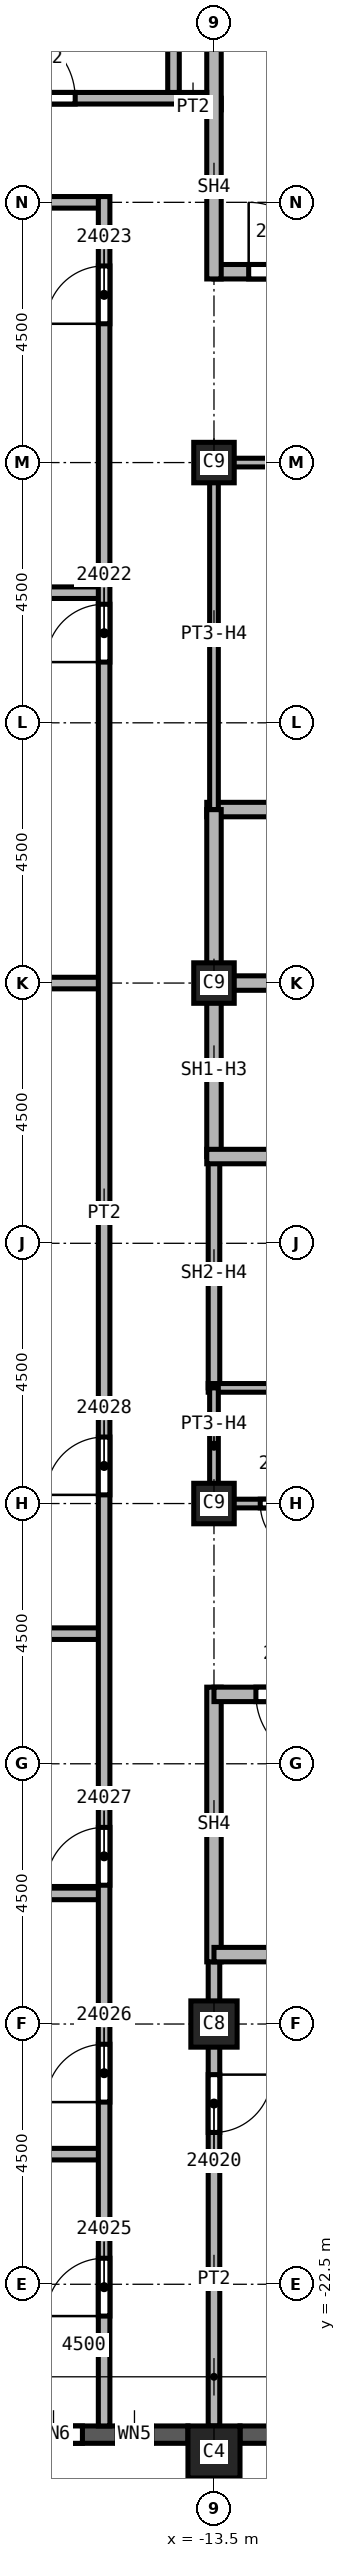
"""IFC4 building model, lengths in metres.
Left out: names, types, materials, properties, quantities, classifications, styles, units other than length and angle.
Written with IfcOpenShell. Run it as: python <this file> out.ifc"""

import sys

from ifc_helpers import new_model, si_unit, direction, frame, frame_2d, origin, origin_2d, place, context, subcontext, project, spatial, rectangle, extrude, element, fill, save


model = new_model("IFC4")
c1 = context("Model", 3, precision=1e-05, world=origin(), true_north=direction((0.0, 1.0)))
c2 = subcontext(c1, "Body", "Model", "MODEL_VIEW")
j1 = project(units=[si_unit("LENGTHUNIT", "METRE"), si_unit("PLANEANGLEUNIT", "RADIAN")], contexts=[c1])
p1 = place(None, origin())
s1 = spatial("IfcSite", under=j1, at=p1, CompositionType="ELEMENT")
p2 = place(p1, origin())
s2 = spatial("IfcBuilding", under=s1, at=p2, CompositionType="ELEMENT")
p3 = place(p2, frame((0.0, 0.0, 338.0)))
s3 = spatial("IfcBuildingStorey", under=s2, at=p3, CompositionType="ELEMENT", Elevation=338.0)
p4 = place(p3, frame((-13.5, -18.0, 0.0), z_axis=(0.0, 0.0, 1.0), x_axis=(1.0, 0.0, 0.0)))
e1 = element("IfcColumn", 1, at=p4, inside=s3, PredefinedType="COLUMN", context=c2, shape_type="SweptSolid", body=[
    extrude(rectangle(XDim=0.8, YDim=0.8, at=origin_2d()), origin(), (0.0, 0.0, 1.0), 3.74),
])
for number, where, z_axis, x_axis in (
    (2, (-13.5, 0.0, 0.0), (0.0, 0.0, 1.0), (1.0, 0.0, 0.0)),
    (3, (-13.5, 9.0, 0.0), (0.0, 0.0, 1.0), (1.0, 0.0, 0.0)),
    (4, (-13.5, -9.0, 0.0), (0.0, 0.0, 1.0), (1.0, 0.0, 0.0)),
):
    element("IfcColumn", number, at=place(p3, frame(where, z_axis=z_axis, x_axis=x_axis)), inside=s3, PredefinedType="COLUMN", context=c2, shape_type="SweptSolid", body=[
        extrude(rectangle(XDim=0.7, YDim=0.7, at=origin_2d()), origin(), (0.0, 0.0, 1.0), 3.74),
    ])
p5 = place(p3, frame((-13.5, -25.4, 0.0), z_axis=(0.0, 0.0, 1.0), x_axis=(1.0, 0.0, 0.0)))
e5 = element("IfcColumn", 5, at=p5, inside=s3, PredefinedType="COLUMN", context=c2, shape_type="SweptSolid", body=[
    extrude(rectangle(XDim=0.9, YDim=0.9, at=origin_2d()), origin(), (0.0, 0.0, 1.0), 3.74),
])
p6 = place(p3, frame((-17.55, -25.1, 0.0), z_axis=(0.0, 0.0, 1.0), x_axis=(1.0, 0.0, 0.0)))
e6 = element("IfcWall", 6, at=p6, inside=s3, PredefinedType="SOLIDWALL", context=c2, shape_type="SweptSolid", body=[
    extrude(rectangle(XDim=3.6, YDim=0.3, at=frame_2d((1.8, 0.0))), origin(), (0.0, 0.0, 1.0), 3.14),
])
p7 = place(p6, frame((0.775, 0.0, 0.8)))
e7 = element("IfcOpeningElement", 7, at=p7, cuts=e6, PredefinedType="OPENING", context=c2, shape_type="SweptSolid", body=[
    extrude(rectangle(XDim=1.0, YDim=1.95, at=frame_2d((0.5, 0.975))), frame((0.0, 0.15, 0.0), z_axis=(0.0, -1.0, 0.0), x_axis=(1.0, 0.0, 0.0)), (0.0, 0.0, 1.0), 0.3),
])
p8 = place(p6, frame((2.375, 0.0, 0.8)))
e8 = element("IfcOpeningElement", 8, at=p8, cuts=e6, PredefinedType="OPENING", context=c2, shape_type="SweptSolid", body=[
    extrude(rectangle(XDim=0.6, YDim=1.95, at=frame_2d((0.3, 0.975))), frame((0.0, 0.15, 0.0), z_axis=(0.0, -1.0, 0.0), x_axis=(1.0, 0.0, 0.0)), (0.0, 0.0, 1.0), 0.3),
])
p9 = place(p3, frame((-13.05, -25.1, 0.0), z_axis=(0.0, 0.0, 1.0), x_axis=(1.0, 0.0, 0.0)))
e9 = element("IfcWall", 9, at=p9, inside=s3, PredefinedType="SOLIDWALL", context=c2, shape_type="SweptSolid", body=[
    extrude(rectangle(XDim=3.6, YDim=0.3, at=frame_2d((1.8, 0.0))), origin(), (0.0, 0.0, 1.0), 3.14),
])
p10 = place(p9, frame((0.6, 0.0, 0.8)))
e10 = element("IfcOpeningElement", 10, at=p10, cuts=e9, PredefinedType="OPENING", context=c2, shape_type="SweptSolid", body=[
    extrude(rectangle(XDim=2.4, YDim=1.95, at=frame_2d((1.2, 0.975))), frame((0.0, 0.15, 0.0), z_axis=(0.0, -1.0, 0.0), x_axis=(1.0, 0.0, 0.0)), (0.0, 0.0, 1.0), 0.3),
])
for number, where, z_axis, x_axis in (
    (11, (-26.55, -15.75, 0.0), (0.0, 0.0, 1.0), (1.0, 0.0, 0.0)),
    (12, (-26.55, -11.25, 0.0), (0.0, 0.0, 1.0), (1.0, 0.0, 0.0)),
):
    element("IfcWall", number, at=place(p3, frame(where, z_axis=z_axis, x_axis=x_axis)), inside=s3, PredefinedType="PARTITIONING", context=c2, shape_type="SweptSolid", body=[
        extrude(rectangle(XDim=11.15, YDim=0.2, at=frame_2d((5.575, 0.0))), origin(), (0.0, 0.0, 1.0), 3.74),
    ])
p11 = place(p3, frame((-24.3, -20.25, 0.0), z_axis=(0.0, 0.0, 1.0), x_axis=(1.0, 0.0, 0.0)))
e13 = element("IfcWall", 13, at=p11, inside=s3, PredefinedType="PARTITIONING", context=c2, shape_type="SweptSolid", body=[
    extrude(rectangle(XDim=8.9, YDim=0.2, at=frame_2d((4.45, 0.0))), origin(), (0.0, 0.0, 1.0), 3.74),
])
p12 = place(p3, frame((-15.4, 0.0, 0.0), z_axis=(0.0, 0.0, 1.0), x_axis=(-1.0, 0.0, 0.0)))
e14 = element("IfcWall", 14, at=p12, inside=s3, PredefinedType="PARTITIONING", context=c2, shape_type="SweptSolid", body=[
    extrude(rectangle(XDim=11.15, YDim=0.2, at=frame_2d((5.575, 0.0))), origin(), (0.0, 0.0, 1.0), 3.74),
])
p13 = place(p3, frame((-20.0, 6.75, 0.0), z_axis=(0.0, 0.0, 1.0), x_axis=(1.0, 0.0, 0.0)))
e15 = element("IfcWall", 15, at=p13, inside=s3, PredefinedType="PARTITIONING", context=c2, shape_type="SweptSolid", body=[
    extrude(rectangle(XDim=4.6, YDim=0.2, at=frame_2d((2.3, 0.0))), origin(), (0.0, 0.0, 1.0), 3.74),
])
p14 = place(p3, frame((-15.4, 13.5, 0.0), z_axis=(0.0, 0.0, 1.0), x_axis=(-1.0, 0.0, 0.0)))
e16 = element("IfcWall", 16, at=p14, inside=s3, PredefinedType="PARTITIONING", context=c2, shape_type="SweptSolid", body=[
    extrude(rectangle(XDim=6.6, YDim=0.2, at=frame_2d((3.3, 0.0))), origin(), (0.0, 0.0, 1.0), 3.74),
])
p15 = place(p3, frame((-15.4, -24.95, 0.0), z_axis=(0.0, 0.0, 1.0), x_axis=(0.0, 1.0, 0.0)))
e17 = element("IfcWall", 17, at=p15, inside=s3, PredefinedType="PARTITIONING", context=c2, shape_type="SweptSolid", body=[
    extrude(rectangle(XDim=38.55, YDim=0.2, at=frame_2d((19.275, 0.0))), origin(), (0.0, 0.0, 1.0), 3.74),
])
p16 = place(p15, frame((30.5, 0.0, 0.0)))
e18 = element("IfcOpeningElement", 18, at=p16, cuts=e17, PredefinedType="OPENING", context=c2, shape_type="SweptSolid", body=[
    extrude(rectangle(XDim=1.0, YDim=2.1, at=frame_2d((0.5, 1.05))), frame((0.0, 0.1, 0.0), z_axis=(0.0, -1.0, 0.0), x_axis=(1.0, 0.0, 0.0)), (0.0, 0.0, 1.0), 0.2),
])
p17 = place(p15, frame((36.35, 0.0, 0.0)))
e19 = element("IfcOpeningElement", 19, at=p17, cuts=e17, PredefinedType="OPENING", context=c2, shape_type="SweptSolid", body=[
    extrude(rectangle(XDim=1.0, YDim=2.1, at=frame_2d((0.5, 1.05))), frame((0.0, 0.1, 0.0), z_axis=(0.0, -1.0, 0.0), x_axis=(1.0, 0.0, 0.0)), (0.0, 0.0, 1.0), 0.2),
])
p18 = place(p15, frame((1.9, 0.0, 0.0)))
e20 = element("IfcOpeningElement", 20, at=p18, cuts=e17, PredefinedType="OPENING", context=c2, shape_type="SweptSolid", body=[
    extrude(rectangle(XDim=1.0, YDim=2.1, at=frame_2d((0.5, 1.05))), frame((0.0, 0.1, 0.0), z_axis=(0.0, -1.0, 0.0), x_axis=(1.0, 0.0, 0.0)), (0.0, 0.0, 1.0), 0.2),
])
p19 = place(p15, frame((5.6, 0.0, 0.0)))
e21 = element("IfcOpeningElement", 21, at=p19, cuts=e17, PredefinedType="OPENING", context=c2, shape_type="SweptSolid", body=[
    extrude(rectangle(XDim=1.0, YDim=2.1, at=frame_2d((0.5, 1.05))), frame((0.0, 0.1, 0.0), z_axis=(0.0, -1.0, 0.0), x_axis=(1.0, 0.0, 0.0)), (0.0, 0.0, 1.0), 0.2),
])
p20 = place(p15, frame((9.35, 0.0, 0.0)))
e22 = element("IfcOpeningElement", 22, at=p20, cuts=e17, PredefinedType="OPENING", context=c2, shape_type="SweptSolid", body=[
    extrude(rectangle(XDim=1.0, YDim=2.1, at=frame_2d((0.5, 1.05))), frame((0.0, 0.1, 0.0), z_axis=(0.0, -1.0, 0.0), x_axis=(1.0, 0.0, 0.0)), (0.0, 0.0, 1.0), 0.2),
])
p21 = place(p15, frame((16.1, 0.0, 0.0)))
e23 = element("IfcOpeningElement", 23, at=p21, cuts=e17, PredefinedType="OPENING", context=c2, shape_type="SweptSolid", body=[
    extrude(rectangle(XDim=1.0, YDim=2.1, at=frame_2d((0.5, 1.05))), frame((0.0, 0.1, 0.0), z_axis=(0.0, -1.0, 0.0), x_axis=(1.0, 0.0, 0.0)), (0.0, 0.0, 1.0), 0.2),
])
p22 = place(p3, frame((-14.1, 15.2, 0.0), z_axis=(0.0, 0.0, 1.0), x_axis=(1.0, 0.0, 0.0)))
e24 = element("IfcWall", 24, at=p22, inside=s3, PredefinedType="PARTITIONING", context=c2, shape_type="SweptSolid", body=[
    extrude(rectangle(XDim=0.725, YDim=0.2, at=frame_2d((0.363, 0.0))), origin(), (0.0, 0.0, 1.0), 3.74),
])
p23 = place(p3, frame((-13.5, -16.675, 0.0), z_axis=(0.0, 0.0, 1.0), x_axis=(0.0, -1.0, 0.0)))
e25 = element("IfcWall", 25, at=p23, inside=s3, PredefinedType="PARTITIONING", context=c2, shape_type="SweptSolid", body=[
    extrude(rectangle(XDim=8.275, YDim=0.2, at=frame_2d((4.137, 0.0))), origin(), (0.0, 0.0, 1.0), 3.74),
])
p24 = place(p23, frame((2.2, 0.0, 0.0)))
e26 = element("IfcOpeningElement", 26, at=p24, cuts=e25, PredefinedType="OPENING", context=c2, shape_type="SweptSolid", body=[
    extrude(rectangle(XDim=1.0, YDim=2.1, at=frame_2d((0.5, 1.05))), frame((0.0, 0.1, 0.0), z_axis=(0.0, -1.0, 0.0), x_axis=(1.0, 0.0, 0.0)), (0.0, 0.0, 1.0), 0.2),
])
p25 = place(p3, frame((-13.5, -7.0, 0.0), z_axis=(0.0, 0.0, 1.0), x_axis=(0.0, 1.0, 0.0)))
e27 = element("IfcWall", 27, at=p25, inside=s3, PredefinedType="SOLIDWALL", context=c2, shape_type="SweptSolid", body=[
    extrude(rectangle(XDim=4.0, YDim=0.2, at=frame_2d((2.0, 0.0))), origin(), (0.0, 0.0, 1.0), 3.062),
])
p26 = place(p3, frame((-13.625, 0.0, 0.0), z_axis=(0.0, 0.0, 1.0), x_axis=(1.0, 0.0, 0.0)))
e28 = element("IfcWall", 28, at=p26, inside=s3, PredefinedType="SOLIDWALL", context=c2, shape_type="SweptSolid", body=[
    extrude(rectangle(XDim=3.125, YDim=0.25, at=frame_2d((1.562, 0.0))), origin(), (0.0, 0.0, 1.0), 3.74),
])
p27 = place(p3, frame((-13.625, 3.0, 0.0), z_axis=(0.0, 0.0, 1.0), x_axis=(1.0, 0.0, 0.0)))
e29 = element("IfcWall", 29, at=p27, inside=s3, PredefinedType="SOLIDWALL", context=c2, shape_type="SweptSolid", body=[
    extrude(rectangle(XDim=6.125, YDim=0.25, at=frame_2d((3.062, 0.0))), origin(), (0.0, 0.0, 1.0), 3.74),
])
p28 = place(p27, frame((4.0, 0.0, 0.0)))
e30 = element("IfcOpeningElement", 30, at=p28, cuts=e29, PredefinedType="OPENING", context=c2, shape_type="SweptSolid", body=[
    extrude(rectangle(XDim=1.1, YDim=2.1, at=frame_2d((0.55, 1.05))), frame((0.0, 0.125, 0.0), z_axis=(0.0, -1.0, 0.0), x_axis=(1.0, 0.0, 0.0)), (0.0, 0.0, 1.0), 0.25),
])
p29 = place(p3, frame((-13.5, -3.0, 0.0), z_axis=(0.0, 0.0, 1.0), x_axis=(0.0, 1.0, 0.0)))
e31 = element("IfcWall", 31, at=p29, inside=s3, PredefinedType="SOLIDWALL", context=c2, shape_type="SweptSolid", body=[
    extrude(rectangle(XDim=6.0, YDim=0.25, at=frame_2d((3.0, 0.0))), origin(), (0.0, 0.0, 1.0), 3.062),
])
p30 = place(p3, frame((-13.625, -3.0, 0.0), z_axis=(0.0, 0.0, 1.0), x_axis=(1.0, 0.0, 0.0)))
e32 = element("IfcWall", 32, at=p30, inside=s3, PredefinedType="SOLIDWALL", context=c2, shape_type="SweptSolid", body=[
    extrude(rectangle(XDim=6.125, YDim=0.25, at=frame_2d((3.062, 0.0))), origin(), (0.0, 0.0, 1.0), 3.74),
])
p31 = place(p30, frame((4.0, 0.0, 0.0)))
e33 = element("IfcOpeningElement", 33, at=p31, cuts=e32, PredefinedType="OPENING", context=c2, shape_type="SweptSolid", body=[
    extrude(rectangle(XDim=1.1, YDim=2.1, at=frame_2d((0.55, 1.05))), frame((0.0, 0.125, 0.0), z_axis=(0.0, -1.0, 0.0), x_axis=(1.0, 0.0, 0.0)), (0.0, 0.0, 1.0), 0.25),
])
p32 = place(p3, frame((-13.5, -12.175, 0.0), z_axis=(0.0, 0.0, 1.0), x_axis=(0.0, -1.0, 0.0)))
e34 = element("IfcWall", 34, at=p32, inside=s3, PredefinedType="SOLIDWALL", context=c2, shape_type="SweptSolid", body=[
    extrude(rectangle(XDim=4.75, YDim=0.25, at=frame_2d((2.375, 0.0))), origin(), (0.0, 0.0, 1.0), 3.74),
])
p33 = place(p3, frame((-13.5, 12.3, 0.0), z_axis=(0.0, 0.0, 1.0), x_axis=(1.0, 0.0, 0.0)))
e35 = element("IfcWall", 35, at=p33, inside=s3, PredefinedType="SOLIDWALL", context=c2, shape_type="SweptSolid", body=[
    extrude(rectangle(XDim=9.125, YDim=0.25, at=frame_2d((4.562, 0.0))), origin(), (0.0, 0.0, 1.0), 3.74),
])
p34 = place(p33, frame((0.6, 0.0, 0.0)))
e36 = element("IfcOpeningElement", 36, at=p34, cuts=e35, PredefinedType="OPENING", context=c2, shape_type="SweptSolid", body=[
    extrude(rectangle(XDim=1.2, YDim=2.1, at=frame_2d((0.6, 1.05))), frame((0.0, 0.125, 0.0), z_axis=(0.0, -1.0, 0.0), x_axis=(1.0, 0.0, 0.0)), (0.0, 0.0, 1.0), 0.25),
])
p35 = place(p3, frame((-13.5, 12.175, 0.0), z_axis=(0.0, 0.0, 1.0), x_axis=(0.0, 1.0, 0.0)))
e37 = element("IfcWall", 37, at=p35, inside=s3, PredefinedType="SOLIDWALL", context=c2, shape_type="SweptSolid", body=[
    extrude(rectangle(XDim=4.75, YDim=0.25, at=frame_2d((2.375, 0.0))), origin(), (0.0, 0.0, 1.0), 3.74),
])
p36 = place(p3, frame((-4.5, -16.8, 0.0), z_axis=(0.0, 0.0, 1.0), x_axis=(-1.0, 0.0, 0.0)))
e38 = element("IfcWall", 38, at=p36, inside=s3, PredefinedType="SOLIDWALL", context=c2, shape_type="SweptSolid", body=[
    extrude(rectangle(XDim=9.0, YDim=0.25, at=frame_2d((4.5, 0.0))), origin(), (0.0, 0.0, 1.0), 3.74),
])
p37 = place(p3, frame((-4.375, -12.3, 0.0), z_axis=(0.0, 0.0, 1.0), x_axis=(-1.0, 0.0, 0.0)))
e39 = element("IfcWall", 39, at=p37, inside=s3, PredefinedType="SOLIDWALL", context=c2, shape_type="SweptSolid", body=[
    extrude(rectangle(XDim=9.125, YDim=0.25, at=frame_2d((4.562, 0.0))), origin(), (0.0, 0.0, 1.0), 3.74),
])
p38 = place(p37, frame((7.2, 0.0, 0.0)))
e40 = element("IfcOpeningElement", 40, at=p38, cuts=e39, PredefinedType="OPENING", context=c2, shape_type="SweptSolid", body=[
    extrude(rectangle(XDim=1.2, YDim=2.1, at=frame_2d((0.6, 1.05))), frame((0.0, 0.125, 0.0), z_axis=(0.0, -1.0, 0.0), x_axis=(1.0, 0.0, 0.0)), (0.0, 0.0, 1.0), 0.25),
])
p39 = place(p3, frame((-13.6, -7.0, 0.0), z_axis=(0.0, 0.0, 1.0), x_axis=(1.0, 0.0, 0.0)))
e41 = element("IfcWall", 41, at=p39, inside=s3, PredefinedType="PARTITIONING", context=c2, shape_type="SweptSolid", body=[
    extrude(rectangle(XDim=3.1, YDim=0.15, at=frame_2d((1.55, 0.0))), origin(), (0.0, 0.0, 1.0), 3.74),
])
p40 = place(p3, frame((-13.5, -9.075, 0.0), z_axis=(0.0, 0.0, 1.0), x_axis=(0.0, 1.0, 0.0)))
e42 = element("IfcWall", 42, at=p40, inside=s3, PredefinedType="PARTITIONING", context=c2, shape_type="SweptSolid", body=[
    extrude(rectangle(XDim=2.075, YDim=0.15, at=frame_2d((1.038, 0.0))), origin(), (0.0, 0.0, 1.0), 3.062),
])
p41 = place(p3, frame((-13.5, 3.0, 0.0), z_axis=(0.0, 0.0, 1.0), x_axis=(0.0, 1.0, 0.0)))
e43 = element("IfcWall", 43, at=p41, inside=s3, PredefinedType="PARTITIONING", context=c2, shape_type="SweptSolid", body=[
    extrude(rectangle(XDim=6.075, YDim=0.15, at=frame_2d((3.038, 0.0))), origin(), (0.0, 0.0, 1.0), 3.062),
])
p42 = place(p3, frame((-13.5, 9.0, 0.0), z_axis=(0.0, 0.0, 1.0), x_axis=(1.0, 0.0, 0.0)))
e44 = element("IfcWall", 44, at=p42, inside=s3, PredefinedType="PARTITIONING", context=c2, shape_type="SweptSolid", body=[
    extrude(rectangle(XDim=3.0, YDim=0.15, at=frame_2d((1.5, 0.0))), origin(), (0.0, 0.0, 1.0), 3.062),
])
p43 = place(p3, frame((-10.5, -9.0, 0.0), z_axis=(0.0, 0.0, 1.0), x_axis=(-1.0, 0.0, 0.0)))
e45 = element("IfcWall", 45, at=p43, inside=s3, PredefinedType="PARTITIONING", context=c2, shape_type="SweptSolid", body=[
    extrude(rectangle(XDim=3.0, YDim=0.15, at=frame_2d((1.5, 0.0))), origin(), (0.0, 0.0, 1.0), 3.062),
])
p44 = place(p43, frame((1.3, 0.0, 0.0)))
e46 = element("IfcOpeningElement", 46, at=p44, cuts=e45, PredefinedType="OPENING", context=c2, shape_type="SweptSolid", body=[
    extrude(rectangle(XDim=0.9, YDim=2.1, at=frame_2d((0.45, 1.05))), frame((0.0, 0.075, 0.0), z_axis=(0.0, -1.0, 0.0), x_axis=(1.0, 0.0, 0.0)), (0.0, 0.0, 1.0), 0.15),
])
p45 = place(p3, frame((-21.9, 15.3, 0.0), z_axis=(0.0, 0.0, 1.0), x_axis=(1.0, 0.0, 0.0)))
e47 = element("IfcWall", 47, at=p45, inside=s3, PredefinedType="SOLIDWALL", context=c2, shape_type="SweptSolid", body=[
    extrude(rectangle(XDim=8.275, YDim=0.2, at=frame_2d((4.137, 0.0))), origin(), (0.0, 0.0, 1.0), 3.74),
])
p46 = place(p45, frame((4.8, 0.0, 0.0)))
e48 = element("IfcOpeningElement", 48, at=p46, cuts=e47, PredefinedType="OPENING", context=c2, shape_type="SweptSolid", body=[
    extrude(rectangle(XDim=1.2, YDim=2.1, at=frame_2d((0.6, 1.05))), frame((0.0, 0.1, 0.0), z_axis=(0.0, -1.0, 0.0), x_axis=(1.0, 0.0, 0.0)), (0.0, 0.0, 1.0), 0.2),
])
p47 = place(p3, frame((-14.2, 15.4, 0.0), z_axis=(0.0, 0.0, 1.0), x_axis=(0.0, 1.0, 0.0)))
e49 = element("IfcWall", 49, at=p47, inside=s3, PredefinedType="SOLIDWALL", context=c2, shape_type="SweptSolid", body=[
    extrude(rectangle(XDim=5.9, YDim=0.2, at=frame_2d((2.95, 0.0))), origin(), (0.0, 0.0, 1.0), 3.74),
])
p48 = place(p44, origin())
e50 = element("IfcDoor", 50, at=p48, inside=s3, OperationType="SINGLE_SWING_RIGHT", PredefinedType="DOOR", context=c2, shape_type="SweptSolid", body=[
    extrude(rectangle(XDim=0.9, YDim=2.1, at=frame_2d((0.45, 1.05))), frame((0.0, 0.025, 0.0), z_axis=(0.0, -1.0, 0.0), x_axis=(1.0, 0.0, 0.0)), (0.0, 0.0, 1.0), 0.05),
])
fill(e46, e50)
p49 = place(p34, origin())
e51 = element("IfcDoor", 51, at=p49, inside=s3, OperationType="SINGLE_SWING_LEFT", PredefinedType="DOOR", context=c2, shape_type="SweptSolid", body=[
    extrude(rectangle(XDim=1.2, YDim=2.1, at=frame_2d((0.6, 1.05))), frame((0.0, 0.025, 0.0), z_axis=(0.0, -1.0, 0.0), x_axis=(1.0, 0.0, 0.0)), (0.0, 0.0, 1.0), 0.05),
])
fill(e36, e51)
p50 = place(p38, origin())
e52 = element("IfcDoor", 52, at=p50, inside=s3, OperationType="SINGLE_SWING_RIGHT", PredefinedType="DOOR", context=c2, shape_type="SweptSolid", body=[
    extrude(rectangle(XDim=1.2, YDim=2.1, at=frame_2d((0.6, 1.05))), frame((0.0, 0.025, 0.0), z_axis=(0.0, -1.0, 0.0), x_axis=(1.0, 0.0, 0.0)), (0.0, 0.0, 1.0), 0.05),
])
fill(e40, e52)
p51 = place(p24, origin())
e53 = element("IfcDoor", 53, at=p51, inside=s3, OperationType="SINGLE_SWING_LEFT", PredefinedType="DOOR", context=c2, shape_type="SweptSolid", body=[
    extrude(rectangle(XDim=1.0, YDim=2.1, at=frame_2d((0.5, 1.05))), frame((0.0, 0.025, 0.0), z_axis=(0.0, -1.0, 0.0), x_axis=(1.0, 0.0, 0.0)), (0.0, 0.0, 1.0), 0.05),
])
fill(e26, e53)
p52 = place(p16, origin())
e54 = element("IfcDoor", 54, at=p52, inside=s3, OperationType="SINGLE_SWING_LEFT", PredefinedType="DOOR", context=c2, shape_type="SweptSolid", body=[
    extrude(rectangle(XDim=1.0, YDim=2.1, at=frame_2d((0.5, 1.05))), frame((0.0, 0.025, 0.0), z_axis=(0.0, -1.0, 0.0), x_axis=(1.0, 0.0, 0.0)), (0.0, 0.0, 1.0), 0.05),
])
fill(e18, e54)
p53 = place(p17, origin())
e55 = element("IfcDoor", 55, at=p53, inside=s3, OperationType="SINGLE_SWING_RIGHT", PredefinedType="DOOR", context=c2, shape_type="SweptSolid", body=[
    extrude(rectangle(XDim=1.0, YDim=2.1, at=frame_2d((0.5, 1.05))), frame((0.0, 0.025, 0.0), z_axis=(0.0, -1.0, 0.0), x_axis=(1.0, 0.0, 0.0)), (0.0, 0.0, 1.0), 0.05),
])
fill(e19, e55)
p54 = place(p18, origin())
e56 = element("IfcDoor", 56, at=p54, inside=s3, OperationType="SINGLE_SWING_RIGHT", PredefinedType="DOOR", context=c2, shape_type="SweptSolid", body=[
    extrude(rectangle(XDim=1.0, YDim=2.1, at=frame_2d((0.5, 1.05))), frame((0.0, 0.025, 0.0), z_axis=(0.0, -1.0, 0.0), x_axis=(1.0, 0.0, 0.0)), (0.0, 0.0, 1.0), 0.05),
])
fill(e20, e56)
p55 = place(p19, origin())
e57 = element("IfcDoor", 57, at=p55, inside=s3, OperationType="SINGLE_SWING_LEFT", PredefinedType="DOOR", context=c2, shape_type="SweptSolid", body=[
    extrude(rectangle(XDim=1.0, YDim=2.1, at=frame_2d((0.5, 1.05))), frame((0.0, 0.025, 0.0), z_axis=(0.0, -1.0, 0.0), x_axis=(1.0, 0.0, 0.0)), (0.0, 0.0, 1.0), 0.05),
])
fill(e21, e57)
p56 = place(p20, origin())
e58 = element("IfcDoor", 58, at=p56, inside=s3, OperationType="SINGLE_SWING_RIGHT", PredefinedType="DOOR", context=c2, shape_type="SweptSolid", body=[
    extrude(rectangle(XDim=1.0, YDim=2.1, at=frame_2d((0.5, 1.05))), frame((0.0, 0.025, 0.0), z_axis=(0.0, -1.0, 0.0), x_axis=(1.0, 0.0, 0.0)), (0.0, 0.0, 1.0), 0.05),
])
fill(e22, e58)
p57 = place(p21, origin())
e59 = element("IfcDoor", 59, at=p57, inside=s3, OperationType="SINGLE_SWING_LEFT", PredefinedType="DOOR", context=c2, shape_type="SweptSolid", body=[
    extrude(rectangle(XDim=1.0, YDim=2.1, at=frame_2d((0.5, 1.05))), frame((0.0, 0.025, 0.0), z_axis=(0.0, -1.0, 0.0), x_axis=(1.0, 0.0, 0.0)), (0.0, 0.0, 1.0), 0.05),
])
fill(e23, e59)
p58 = place(p46, origin())
e60 = element("IfcDoor", 60, at=p58, inside=s3, OperationType="SINGLE_SWING_RIGHT", PredefinedType="DOOR", context=c2, shape_type="SweptSolid", body=[
    extrude(rectangle(XDim=1.2, YDim=2.1, at=frame_2d((0.6, 1.05))), frame((0.0, 0.025, 0.0), z_axis=(0.0, -1.0, 0.0), x_axis=(1.0, 0.0, 0.0)), (0.0, 0.0, 1.0), 0.05),
])
fill(e48, e60)
p59 = place(p7, origin())
e61 = element("IfcWindow", 61, at=p59, inside=s3, PartitioningType="SINGLE_PANEL", PredefinedType="WINDOW", context=c2, shape_type="SweptSolid", body=[
    extrude(rectangle(XDim=1.0, YDim=1.95, at=frame_2d((0.5, 0.975))), frame((0.0, 0.03, 0.0), z_axis=(0.0, -1.0, 0.0), x_axis=(1.0, 0.0, 0.0)), (0.0, 0.0, 1.0), 0.06),
])
fill(e7, e61)
p60 = place(p8, origin())
e62 = element("IfcWindow", 62, at=p60, inside=s3, PartitioningType="SINGLE_PANEL", PredefinedType="WINDOW", context=c2, shape_type="SweptSolid", body=[
    extrude(rectangle(XDim=0.6, YDim=1.95, at=frame_2d((0.3, 0.975))), frame((0.0, 0.03, 0.0), z_axis=(0.0, -1.0, 0.0), x_axis=(1.0, 0.0, 0.0)), (0.0, 0.0, 1.0), 0.06),
])
fill(e8, e62)
save(model, sys.argv[1])
